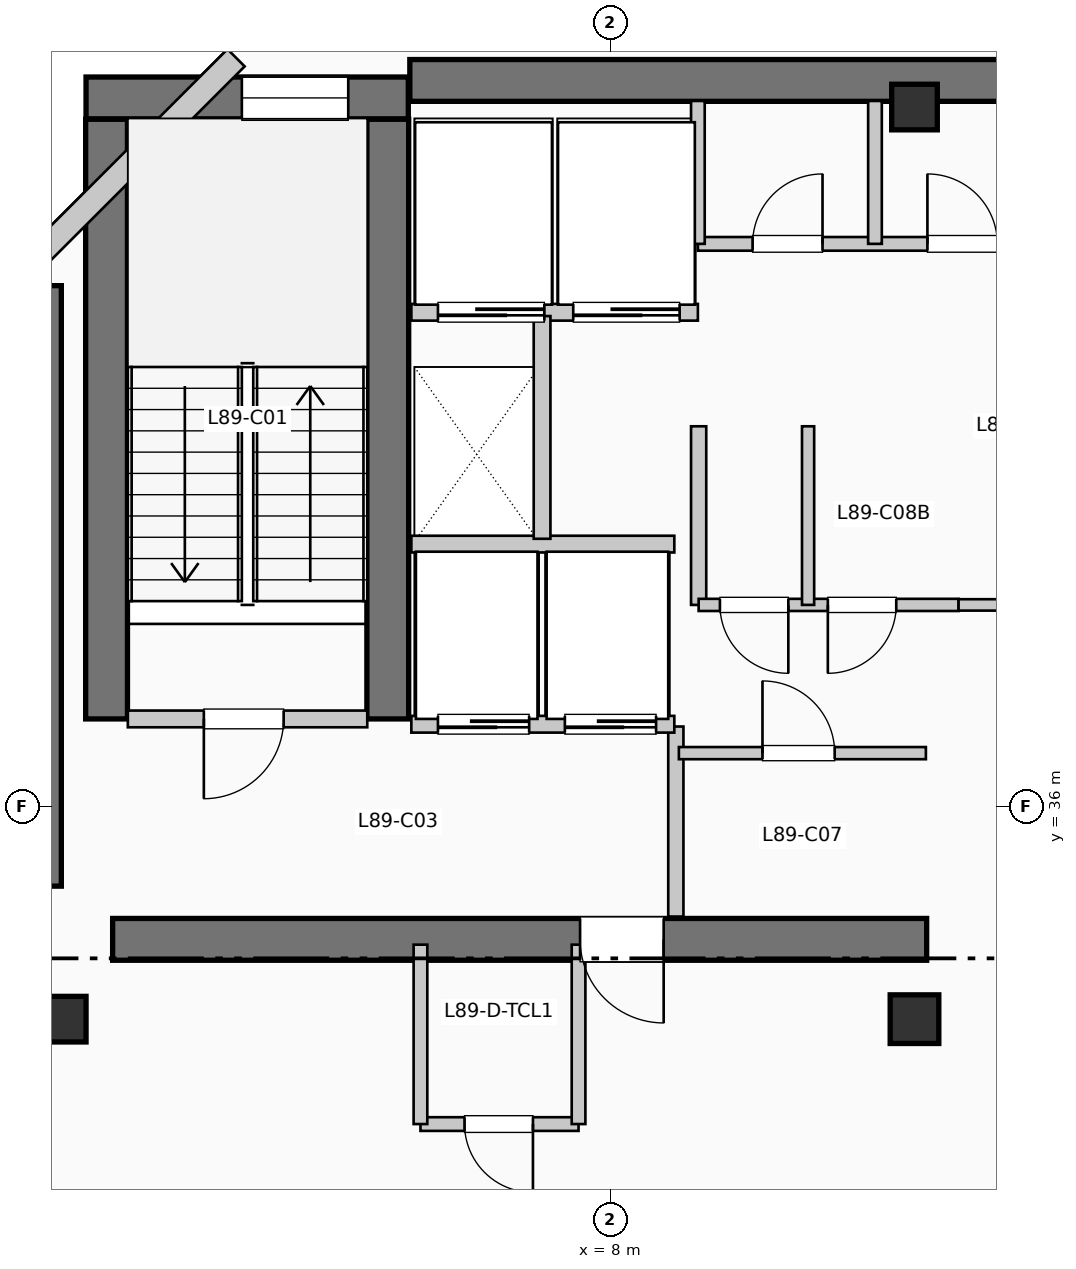
"""IFC4 building model, lengths in metres.
Left out: names, types, materials, properties, quantities, classifications, styles, units other than length and angle.
Written with IfcOpenShell. Run it as: python <this file> out.ifc"""

import sys

from ifc_helpers import new_model, si_unit, direction, frame, frame_2d, origin, origin_2d, place, context, subcontext, project, spatial, rectangle, extrude, element, fill, save


model = new_model("IFC4")
c1 = context("Model", 3, precision=1e-05, world=origin(), true_north=direction((0.0, 1.0)))
c2 = subcontext(c1, "Body", "Model", "MODEL_VIEW")
j1 = project(units=[si_unit("LENGTHUNIT", "METRE"), si_unit("PLANEANGLEUNIT", "RADIAN")], contexts=[c1])
p1 = place(None, origin())
s1 = spatial("IfcSite", under=j1, at=p1, CompositionType="ELEMENT")
p2 = place(p1, origin())
s2 = spatial("IfcBuilding", under=s1, at=p2, CompositionType="ELEMENT")
p3 = place(p2, frame((0.0, 0.0, 365.97)))
s3 = spatial("IfcBuildingStorey", under=s2, at=p3, CompositionType="ELEMENT", Elevation=365.97)
p4 = place(p3, frame((5.36, 45.55, 0.0), z_axis=(0.0, 0.0, 1.0), x_axis=(1.0, 0.0, 0.0)))
e1 = element("IfcWall", 1, at=p4, inside=s3, PredefinedType="SHEAR", context=c2, shape_type="SweptSolid", body=[
    extrude(rectangle(XDim=13.98, YDim=0.55, at=frame_2d((6.99, 0.0))), origin(), (0.0, 0.0, 1.0), 3.96),
])
p5 = place(p3, frame((0.5, 34.95, 0.0), z_axis=(0.0, 0.0, 1.0), x_axis=(0.0, 1.0, 0.0)))
e2 = element("IfcWall", 2, at=p5, inside=s3, PredefinedType="SHEAR", context=c2, shape_type="SweptSolid", body=[
    extrude(rectangle(XDim=7.9, YDim=0.55, at=frame_2d((3.95, 0.0))), origin(), (0.0, 0.0, 1.0), 3.96),
])
p6 = place(p3, frame((1.45, 34.25, 0.0), z_axis=(0.0, 0.0, 1.0), x_axis=(1.0, 0.0, 0.0)))
e3 = element("IfcWall", 3, at=p6, inside=s3, PredefinedType="SHEAR", context=c2, shape_type="SweptSolid", body=[
    extrude(rectangle(XDim=10.71, YDim=0.55, at=frame_2d((5.355, 0.0))), origin(), (0.0, 0.0, 1.0), 3.96),
])
p7 = place(p6, frame((7.25, 0.0, 0.0), z_axis=(0.0, 0.0, 1.0), x_axis=(-1.0, 0.0, 0.0)))
e4 = element("IfcOpeningElement", 4, at=p7, cuts=e3, PredefinedType="OPENING", context=c2, shape_type="SweptSolid", body=[
    extrude(rectangle(XDim=1.1, YDim=2.15, at=frame_2d((0.55, 1.075))), frame((0.0, 0.285, 0.0), z_axis=(0.0, -1.0, 0.0), x_axis=(1.0, 0.0, 0.0)), (0.0, 0.0, 1.0), 0.57),
])
for number, where, z_axis, x_axis in (
    (5, (1.37, 37.15, 0.0), (0.0, 0.0, 1.0), (0.0, 1.0, 0.0)),
    (6, (5.07, 37.15, 0.0), (0.0, 0.0, 1.0), (0.0, 1.0, 0.0)),
):
    element("IfcWall", number, at=place(p3, frame(where, z_axis=z_axis, x_axis=x_axis)), inside=s3, PredefinedType="SHEAR", context=c2, shape_type="SweptSolid", body=[
        extrude(rectangle(XDim=7.89, YDim=0.55, at=frame_2d((3.945, 0.0))), origin(), (0.0, 0.0, 1.0), 3.96),
    ])
p8 = place(p3, frame((1.1, 45.32, 0.0), z_axis=(0.0, 0.0, 1.0), x_axis=(1.0, 0.0, 0.0)))
e7 = element("IfcWall", 7, at=p8, inside=s3, PredefinedType="SHEAR", context=c2, shape_type="SweptSolid", body=[
    extrude(rectangle(XDim=4.24, YDim=0.55, at=frame_2d((2.12, 0.0))), origin(), (0.0, 0.0, 1.0), 3.96),
])
p9 = place(p8, frame((2.05, 0.0, 1.05)))
e8 = element("IfcOpeningElement", 8, at=p9, cuts=e7, PredefinedType="OPENING", context=c2, shape_type="SweptSolid", body=[
    extrude(rectangle(XDim=1.4, YDim=1.8, at=frame_2d((0.7, 0.9))), frame((0.0, 0.285, 0.0), z_axis=(0.0, -1.0, 0.0), x_axis=(1.0, 0.0, 0.0)), (0.0, 0.0, 1.0), 0.57),
])
p10 = place(p3, frame((0.8, 33.2, 0.0), z_axis=(0.0, 0.0, 1.0), x_axis=(1.0, 0.0, 0.0)))
e9 = element("IfcColumn", 9, at=p10, inside=s3, PredefinedType="COLUMN", context=c2, shape_type="SweptSolid", body=[
    extrude(rectangle(XDim=0.6, YDim=0.6, at=origin_2d()), origin(), (0.0, 0.0, 1.0), 3.96),
])
p11 = place(p3, frame((12.0, 33.2, 0.0), z_axis=(0.0, 0.0, 1.0), x_axis=(1.0, 0.0, 0.0)))
e10 = element("IfcColumn", 10, at=p11, inside=s3, PredefinedType="COLUMN", context=c2, shape_type="SweptSolid", body=[
    extrude(rectangle(XDim=0.64, YDim=0.64, at=origin_2d()), origin(), (0.0, 0.0, 1.0), 3.96),
])
p12 = place(p3, frame((12.0, 45.2, 0.0), z_axis=(0.0, 0.0, 1.0), x_axis=(1.0, 0.0, 0.0)))
e11 = element("IfcColumn", 11, at=p12, inside=s3, PredefinedType="COLUMN", context=c2, shape_type="SweptSolid", body=[
    extrude(rectangle(XDim=0.6, YDim=0.6, at=origin_2d()), origin(), (0.0, 0.0, 1.0), 3.96),
])
p13 = place(p3, frame((3.074, 45.848, 0.0), z_axis=(0.0, 0.0, 1.0), x_axis=(-0.707106781187, -0.707106781187, 0.0)))
e12 = element("IfcWall", 12, at=p13, inside=s3, PredefinedType="SOLIDWALL", context=c2, shape_type="SweptSolid", body=[
    extrude(rectangle(XDim=4.133, YDim=0.32, at=frame_2d((2.066, 0.0))), origin(), (0.0, 0.0, 1.0), 3.61),
])
p14 = place(p3, frame((1.65, 37.15, 0.0), z_axis=(0.0, 0.0, 1.0), x_axis=(1.0, 0.0, 0.0)))
e13 = element("IfcWall", 13, at=p14, inside=s3, PredefinedType="PARTITIONING", context=c2, shape_type="SweptSolid", body=[
    extrude(rectangle(XDim=3.15, YDim=0.22, at=frame_2d((1.575, 0.0))), origin(), (0.0, 0.0, 1.0), 3.61),
])
p15 = place(p14, frame((2.05, 0.0, 0.0), z_axis=(0.0, 0.0, 1.0), x_axis=(-1.0, 0.0, 0.0)))
e14 = element("IfcOpeningElement", 14, at=p15, cuts=e13, PredefinedType="OPENING", context=c2, shape_type="SweptSolid", body=[
    extrude(rectangle(XDim=1.05, YDim=2.15, at=frame_2d((0.525, 1.075))), frame((0.0, 0.12, 0.0), z_axis=(0.0, -1.0, 0.0), x_axis=(1.0, 0.0, 0.0)), (0.0, 0.0, 1.0), 0.24),
])
p16 = place(p3, frame((8.86, 34.55, 0.0), z_axis=(0.0, 0.0, 1.0), x_axis=(0.0, 1.0, 0.0)))
e15 = element("IfcWall", 15, at=p16, inside=s3, PredefinedType="PARTITIONING", context=c2, shape_type="SweptSolid", body=[
    extrude(rectangle(XDim=2.5, YDim=0.2, at=frame_2d((1.25, 0.0))), origin(), (0.0, 0.0, 1.0), 3.61),
])
p17 = place(p3, frame((5.38, 37.08, 0.0), z_axis=(0.0, 0.0, 1.0), x_axis=(1.0, 0.0, 0.0)))
e16 = element("IfcWall", 16, at=p17, inside=s3, PredefinedType="PARTITIONING", context=c2, shape_type="SweptSolid", body=[
    extrude(rectangle(XDim=3.46, YDim=0.22, at=frame_2d((1.73, 0.0))), origin(), (0.0, 0.0, 1.0), 3.61),
])
p18 = place(p17, frame((1.55, 0.0, 0.0), z_axis=(0.0, 0.0, 1.0), x_axis=(-1.0, 0.0, 0.0)))
e17 = element("IfcOpeningElement", 17, at=p18, cuts=e16, PredefinedType="OPENING", context=c2, shape_type="SweptSolid", body=[
    extrude(rectangle(XDim=1.2, YDim=2.2, at=frame_2d((0.6, 1.1))), frame((0.0, 0.12, 0.0), z_axis=(0.0, -1.0, 0.0), x_axis=(1.0, 0.0, 0.0)), (0.0, 0.0, 1.0), 0.24),
])
p19 = place(p17, frame((3.22, 0.0, 0.0), z_axis=(0.0, 0.0, 1.0), x_axis=(-1.0, 0.0, 0.0)))
e18 = element("IfcOpeningElement", 18, at=p19, cuts=e16, PredefinedType="OPENING", context=c2, shape_type="SweptSolid", body=[
    extrude(rectangle(XDim=1.2, YDim=2.2, at=frame_2d((0.6, 1.1))), frame((0.0, 0.12, 0.0), z_axis=(0.0, -1.0, 0.0), x_axis=(1.0, 0.0, 0.0)), (0.0, 0.0, 1.0), 0.24),
])
p20 = place(p3, frame((5.38, 39.45, 0.0), z_axis=(0.0, 0.0, 1.0), x_axis=(1.0, 0.0, 0.0)))
e19 = element("IfcWall", 19, at=p20, inside=s3, PredefinedType="PARTITIONING", context=c2, shape_type="SweptSolid", body=[
    extrude(rectangle(XDim=3.46, YDim=0.22, at=frame_2d((1.73, 0.0))), origin(), (0.0, 0.0, 1.0), 3.61),
])
p21 = place(p3, frame((5.38, 42.5, 0.0), z_axis=(0.0, 0.0, 1.0), x_axis=(1.0, 0.0, 0.0)))
e20 = element("IfcWall", 20, at=p21, inside=s3, PredefinedType="PARTITIONING", context=c2, shape_type="SweptSolid", body=[
    extrude(rectangle(XDim=3.77, YDim=0.22, at=frame_2d((1.885, 0.0))), origin(), (0.0, 0.0, 1.0), 3.61),
])
p22 = place(p21, frame((1.75, 0.0, 0.0), z_axis=(0.0, 0.0, 1.0), x_axis=(-1.0, 0.0, 0.0)))
e21 = element("IfcOpeningElement", 21, at=p22, cuts=e20, PredefinedType="OPENING", context=c2, shape_type="SweptSolid", body=[
    extrude(rectangle(XDim=1.4, YDim=2.2, at=frame_2d((0.7, 1.1))), frame((0.0, 0.12, 0.0), z_axis=(0.0, -1.0, 0.0), x_axis=(1.0, 0.0, 0.0)), (0.0, 0.0, 1.0), 0.24),
])
p23 = place(p21, frame((3.53, 0.0, 0.0), z_axis=(0.0, 0.0, 1.0), x_axis=(-1.0, 0.0, 0.0)))
e22 = element("IfcOpeningElement", 22, at=p23, cuts=e20, PredefinedType="OPENING", context=c2, shape_type="SweptSolid", body=[
    extrude(rectangle(XDim=1.4, YDim=2.2, at=frame_2d((0.7, 1.1))), frame((0.0, 0.12, 0.0), z_axis=(0.0, -1.0, 0.0), x_axis=(1.0, 0.0, 0.0)), (0.0, 0.0, 1.0), 0.24),
])
p24 = place(p3, frame((7.1, 39.52, 0.0), z_axis=(0.0, 0.0, 1.0), x_axis=(0.0, 1.0, 0.0)))
e23 = element("IfcWall", 23, at=p24, inside=s3, PredefinedType="PARTITIONING", context=c2, shape_type="SweptSolid", body=[
    extrude(rectangle(XDim=2.93, YDim=0.22, at=frame_2d((1.465, 0.0))), origin(), (0.0, 0.0, 1.0), 3.61),
])
p25 = place(p3, frame((9.16, 38.65, 0.0), z_axis=(0.0, 0.0, 1.0), x_axis=(0.0, 1.0, 0.0)))
e24 = element("IfcWall", 24, at=p25, inside=s3, PredefinedType="PARTITIONING", context=c2, shape_type="SweptSolid", body=[
    extrude(rectangle(XDim=2.35, YDim=0.2, at=frame_2d((1.175, 0.0))), origin(), (0.0, 0.0, 1.0), 3.61),
])
p26 = place(p3, frame((5.5, 31.82, 0.0), z_axis=(0.0, 0.0, 1.0), x_axis=(1.0, 0.0, 0.0)))
e25 = element("IfcWall", 25, at=p26, inside=s3, PredefinedType="PLUMBINGWALL", context=c2, shape_type="SweptSolid", body=[
    extrude(rectangle(XDim=2.08, YDim=0.18, at=frame_2d((1.04, 0.0))), origin(), (0.0, 0.0, 1.0), 3.61),
])
p27 = place(p26, frame((1.48, 0.0, 0.0), z_axis=(0.0, 0.0, 1.0), x_axis=(-1.0, 0.0, 0.0)))
e26 = element("IfcOpeningElement", 26, at=p27, cuts=e25, PredefinedType="OPENING", context=c2, shape_type="SweptSolid", body=[
    extrude(rectangle(XDim=0.9, YDim=2.1, at=frame_2d((0.45, 1.05))), frame((0.0, 0.1, 0.0), z_axis=(0.0, -1.0, 0.0), x_axis=(1.0, 0.0, 0.0)), (0.0, 0.0, 1.0), 0.2),
])
for number, where, z_axis, x_axis in (
    (27, (7.58, 31.82, 0.0), (0.0, 0.0, 1.0), (0.0, 1.0, 0.0)),
    (28, (5.5, 31.82, 0.0), (0.0, 0.0, 1.0), (0.0, 1.0, 0.0)),
):
    element("IfcWall", number, at=place(p3, frame(where, z_axis=z_axis, x_axis=x_axis)), inside=s3, PredefinedType="PLUMBINGWALL", context=c2, shape_type="SweptSolid", body=[
        extrude(rectangle(XDim=2.36, YDim=0.18, at=frame_2d((1.18, 0.0))), origin(), (0.0, 0.0, 1.0), 3.61),
    ])
p28 = place(p3, frame((8.9, 36.7, 0.0), z_axis=(0.0, 0.0, 1.0), x_axis=(1.0, 0.0, 0.0)))
e29 = element("IfcWall", 29, at=p28, inside=s3, PredefinedType="PARTITIONING", context=c2, shape_type="SweptSolid", body=[
    extrude(rectangle(XDim=3.25, YDim=0.16, at=frame_2d((1.625, 0.0))), origin(), (0.0, 0.0, 1.0), 3.61),
])
p29 = place(p28, frame((1.1, 0.0, 0.0)))
e30 = element("IfcOpeningElement", 30, at=p29, cuts=e29, PredefinedType="OPENING", context=c2, shape_type="SweptSolid", body=[
    extrude(rectangle(XDim=0.95, YDim=2.15, at=frame_2d((0.475, 1.075))), frame((0.0, 0.09, 0.0), z_axis=(0.0, -1.0, 0.0), x_axis=(1.0, 0.0, 0.0)), (0.0, 0.0, 1.0), 0.18),
])
p30 = place(p3, frame((9.16, 38.65, 0.0), z_axis=(0.0, 0.0, 1.0), x_axis=(1.0, 0.0, 0.0)))
e31 = element("IfcWall", 31, at=p30, inside=s3, PredefinedType="PARTITIONING", context=c2, shape_type="SweptSolid", body=[
    extrude(rectangle(XDim=3.42, YDim=0.16, at=frame_2d((1.71, 0.0))), origin(), (0.0, 0.0, 1.0), 3.61),
])
p31 = place(p30, frame((1.18, 0.0, 0.0), z_axis=(0.0, 0.0, 1.0), x_axis=(-1.0, 0.0, 0.0)))
e32 = element("IfcOpeningElement", 32, at=p31, cuts=e31, PredefinedType="OPENING", context=c2, shape_type="SweptSolid", body=[
    extrude(rectangle(XDim=0.9, YDim=2.15, at=frame_2d((0.45, 1.075))), frame((0.0, 0.09, 0.0), z_axis=(0.0, -1.0, 0.0), x_axis=(1.0, 0.0, 0.0)), (0.0, 0.0, 1.0), 0.18),
])
p32 = place(p30, frame((2.6, 0.0, 0.0), z_axis=(0.0, 0.0, 1.0), x_axis=(-1.0, 0.0, 0.0)))
e33 = element("IfcOpeningElement", 33, at=p32, cuts=e31, PredefinedType="OPENING", context=c2, shape_type="SweptSolid", body=[
    extrude(rectangle(XDim=0.9, YDim=2.15, at=frame_2d((0.45, 1.075))), frame((0.0, 0.09, 0.0), z_axis=(0.0, -1.0, 0.0), x_axis=(1.0, 0.0, 0.0)), (0.0, 0.0, 1.0), 0.18),
])
p33 = place(p3, frame((10.6, 38.65, 0.0), z_axis=(0.0, 0.0, 1.0), x_axis=(0.0, 1.0, 0.0)))
e34 = element("IfcWall", 34, at=p33, inside=s3, PredefinedType="PARTITIONING", context=c2, shape_type="SweptSolid", body=[
    extrude(rectangle(XDim=2.35, YDim=0.16, at=frame_2d((1.175, 0.0))), origin(), (0.0, 0.0, 1.0), 3.61),
])
p34 = place(p3, frame((12.58, 38.65, 0.0), z_axis=(0.0, 0.0, 1.0), x_axis=(1.0, 0.0, 0.0)))
e35 = element("IfcWall", 35, at=p34, inside=s3, PredefinedType="PARTITIONING", context=c2, shape_type="SweptSolid", body=[
    extrude(rectangle(XDim=3.38, YDim=0.15, at=frame_2d((1.69, 0.0))), origin(), (0.0, 0.0, 1.0), 3.61),
])
p35 = place(p34, frame((2.2, 0.0, 0.0), z_axis=(0.0, 0.0, 1.0), x_axis=(-1.0, 0.0, 0.0)))
e36 = element("IfcOpeningElement", 36, at=p35, cuts=e35, PredefinedType="OPENING", context=c2, shape_type="SweptSolid", body=[
    extrude(rectangle(XDim=1.05, YDim=2.15, at=frame_2d((0.525, 1.075))), frame((0.0, 0.085, 0.0), z_axis=(0.0, -1.0, 0.0), x_axis=(1.0, 0.0, 0.0)), (0.0, 0.0, 1.0), 0.17),
])
p36 = place(p3, frame((9.15, 43.4, 0.0), z_axis=(0.0, 0.0, 1.0), x_axis=(1.0, 0.0, 0.0)))
e37 = element("IfcWall", 37, at=p36, inside=s3, PredefinedType="PLUMBINGWALL", context=c2, shape_type="SweptSolid", body=[
    extrude(rectangle(XDim=9.33, YDim=0.18, at=frame_2d((4.665, 0.0))), origin(), (0.0, 0.0, 1.0), 3.61),
])
p37 = place(p36, frame((0.72, 0.0, 0.0)))
e38 = element("IfcOpeningElement", 38, at=p37, cuts=e37, PredefinedType="OPENING", context=c2, shape_type="SweptSolid", body=[
    extrude(rectangle(XDim=0.92, YDim=2.1, at=frame_2d((0.46, 1.05))), frame((0.0, 0.1, 0.0), z_axis=(0.0, -1.0, 0.0), x_axis=(1.0, 0.0, 0.0)), (0.0, 0.0, 1.0), 0.2),
])
p38 = place(p36, frame((3.02, 0.0, 0.0)))
e39 = element("IfcOpeningElement", 39, at=p38, cuts=e37, PredefinedType="OPENING", context=c2, shape_type="SweptSolid", body=[
    extrude(rectangle(XDim=0.92, YDim=2.1, at=frame_2d((0.46, 1.05))), frame((0.0, 0.1, 0.0), z_axis=(0.0, -1.0, 0.0), x_axis=(1.0, 0.0, 0.0)), (0.0, 0.0, 1.0), 0.2),
])
p39 = place(p36, frame((5.34, 0.0, 0.0)))
e40 = element("IfcOpeningElement", 40, at=p39, cuts=e37, PredefinedType="OPENING", context=c2, shape_type="SweptSolid", body=[
    extrude(rectangle(XDim=0.92, YDim=2.1, at=frame_2d((0.46, 1.05))), frame((0.0, 0.1, 0.0), z_axis=(0.0, -1.0, 0.0), x_axis=(1.0, 0.0, 0.0)), (0.0, 0.0, 1.0), 0.2),
])
p40 = place(p36, frame((7.66, 0.0, 0.0)))
e41 = element("IfcOpeningElement", 41, at=p40, cuts=e37, PredefinedType="OPENING", context=c2, shape_type="SweptSolid", body=[
    extrude(rectangle(XDim=0.95, YDim=2.1, at=frame_2d((0.475, 1.05))), frame((0.0, 0.1, 0.0), z_axis=(0.0, -1.0, 0.0), x_axis=(1.0, 0.0, 0.0)), (0.0, 0.0, 1.0), 0.2),
])
for number, where, z_axis, x_axis in (
    (42, (9.15, 43.4, 0.0), (0.0, 0.0, 1.0), (0.0, 1.0, 0.0)),
    (43, (11.48, 43.4, 0.0), (0.0, 0.0, 1.0), (0.0, 1.0, 0.0)),
):
    element("IfcWall", number, at=place(p3, frame(where, z_axis=z_axis, x_axis=x_axis)), inside=s3, PredefinedType="PLUMBINGWALL", context=c2, shape_type="SweptSolid", body=[
        extrude(rectangle(XDim=1.88, YDim=0.18, at=frame_2d((0.94, 0.0))), origin(), (0.0, 0.0, 1.0), 3.61),
    ])
p41 = place(p9, origin())
e44 = element("IfcWindow", 44, at=p41, inside=s3, PartitioningType="SINGLE_PANEL", PredefinedType="WINDOW", context=c2, shape_type="SweptSolid", body=[
    extrude(rectangle(XDim=1.4, YDim=1.8, at=frame_2d((0.7, 0.9))), frame((0.0, 0.03, 0.0), z_axis=(0.0, -1.0, 0.0), x_axis=(1.0, 0.0, 0.0)), (0.0, 0.0, 1.0), 0.06),
])
fill(e8, e44)
p42 = place(p15, origin())
e45 = element("IfcDoor", 45, at=p42, inside=s3, OperationType="SINGLE_SWING_LEFT", PredefinedType="DOOR", context=c2, shape_type="SweptSolid", body=[
    extrude(rectangle(XDim=1.05, YDim=2.15, at=frame_2d((0.525, 1.075))), frame((0.0, 0.025, 0.0), z_axis=(0.0, -1.0, 0.0), x_axis=(1.0, 0.0, 0.0)), (0.0, 0.0, 1.0), 0.05),
])
fill(e14, e45)
p43 = place(p7, origin())
e46 = element("IfcDoor", 46, at=p43, inside=s3, OperationType="SINGLE_SWING_RIGHT", PredefinedType="DOOR", context=c2, shape_type="SweptSolid", body=[
    extrude(rectangle(XDim=1.1, YDim=2.15, at=frame_2d((0.55, 1.075))), frame((0.0, 0.025, 0.0), z_axis=(0.0, -1.0, 0.0), x_axis=(1.0, 0.0, 0.0)), (0.0, 0.0, 1.0), 0.05),
])
fill(e4, e46)
p44 = place(p18, origin())
e47 = element("IfcDoor", 47, at=p44, inside=s3, OperationType="SLIDING_TO_RIGHT", PredefinedType="DOOR", context=c2, shape_type="SweptSolid", body=[
    extrude(rectangle(XDim=1.2, YDim=2.2, at=frame_2d((0.6, 1.1))), frame((0.0, 0.025, 0.0), z_axis=(0.0, -1.0, 0.0), x_axis=(1.0, 0.0, 0.0)), (0.0, 0.0, 1.0), 0.05),
])
fill(e17, e47)
p45 = place(p19, origin())
e48 = element("IfcDoor", 48, at=p45, inside=s3, OperationType="SLIDING_TO_RIGHT", PredefinedType="DOOR", context=c2, shape_type="SweptSolid", body=[
    extrude(rectangle(XDim=1.2, YDim=2.2, at=frame_2d((0.6, 1.1))), frame((0.0, 0.025, 0.0), z_axis=(0.0, -1.0, 0.0), x_axis=(1.0, 0.0, 0.0)), (0.0, 0.0, 1.0), 0.05),
])
fill(e18, e48)
p46 = place(p22, origin())
e49 = element("IfcDoor", 49, at=p46, inside=s3, OperationType="SLIDING_TO_LEFT", PredefinedType="DOOR", context=c2, shape_type="SweptSolid", body=[
    extrude(rectangle(XDim=1.4, YDim=2.2, at=frame_2d((0.7, 1.1))), frame((0.0, 0.025, 0.0), z_axis=(0.0, -1.0, 0.0), x_axis=(1.0, 0.0, 0.0)), (0.0, 0.0, 1.0), 0.05),
])
fill(e21, e49)
p47 = place(p23, origin())
e50 = element("IfcDoor", 50, at=p47, inside=s3, OperationType="SLIDING_TO_LEFT", PredefinedType="DOOR", context=c2, shape_type="SweptSolid", body=[
    extrude(rectangle(XDim=1.4, YDim=2.2, at=frame_2d((0.7, 1.1))), frame((0.0, 0.025, 0.0), z_axis=(0.0, -1.0, 0.0), x_axis=(1.0, 0.0, 0.0)), (0.0, 0.0, 1.0), 0.05),
])
fill(e22, e50)
p48 = place(p27, origin())
e51 = element("IfcDoor", 51, at=p48, inside=s3, OperationType="SINGLE_SWING_RIGHT", PredefinedType="DOOR", context=c2, shape_type="SweptSolid", body=[
    extrude(rectangle(XDim=0.9, YDim=2.1, at=frame_2d((0.45, 1.05))), frame((0.0, 0.025, 0.0), z_axis=(0.0, -1.0, 0.0), x_axis=(1.0, 0.0, 0.0)), (0.0, 0.0, 1.0), 0.05),
])
fill(e26, e51)
p49 = place(p29, origin())
e52 = element("IfcDoor", 52, at=p49, inside=s3, OperationType="SINGLE_SWING_LEFT", PredefinedType="DOOR", context=c2, shape_type="SweptSolid", body=[
    extrude(rectangle(XDim=0.95, YDim=2.15, at=frame_2d((0.475, 1.075))), frame((0.0, 0.025, 0.0), z_axis=(0.0, -1.0, 0.0), x_axis=(1.0, 0.0, 0.0)), (0.0, 0.0, 1.0), 0.05),
])
fill(e30, e52)
p50 = place(p31, origin())
e53 = element("IfcDoor", 53, at=p50, inside=s3, OperationType="SINGLE_SWING_RIGHT", PredefinedType="DOOR", context=c2, shape_type="SweptSolid", body=[
    extrude(rectangle(XDim=0.9, YDim=2.15, at=frame_2d((0.45, 1.075))), frame((0.0, 0.025, 0.0), z_axis=(0.0, -1.0, 0.0), x_axis=(1.0, 0.0, 0.0)), (0.0, 0.0, 1.0), 0.05),
])
fill(e32, e53)
p51 = place(p32, origin())
e54 = element("IfcDoor", 54, at=p51, inside=s3, OperationType="SINGLE_SWING_LEFT", PredefinedType="DOOR", context=c2, shape_type="SweptSolid", body=[
    extrude(rectangle(XDim=0.9, YDim=2.15, at=frame_2d((0.45, 1.075))), frame((0.0, 0.025, 0.0), z_axis=(0.0, -1.0, 0.0), x_axis=(1.0, 0.0, 0.0)), (0.0, 0.0, 1.0), 0.05),
])
fill(e33, e54)
p52 = place(p37, origin())
e55 = element("IfcDoor", 55, at=p52, inside=s3, OperationType="SINGLE_SWING_RIGHT", PredefinedType="DOOR", context=c2, shape_type="SweptSolid", body=[
    extrude(rectangle(XDim=0.92, YDim=2.1, at=frame_2d((0.46, 1.05))), frame((0.0, 0.025, 0.0), z_axis=(0.0, -1.0, 0.0), x_axis=(1.0, 0.0, 0.0)), (0.0, 0.0, 1.0), 0.05),
])
fill(e38, e55)
p53 = place(p38, origin())
e56 = element("IfcDoor", 56, at=p53, inside=s3, OperationType="SINGLE_SWING_LEFT", PredefinedType="DOOR", context=c2, shape_type="SweptSolid", body=[
    extrude(rectangle(XDim=0.92, YDim=2.1, at=frame_2d((0.46, 1.05))), frame((0.0, 0.025, 0.0), z_axis=(0.0, -1.0, 0.0), x_axis=(1.0, 0.0, 0.0)), (0.0, 0.0, 1.0), 0.05),
])
fill(e39, e56)
save(model, sys.argv[1])
